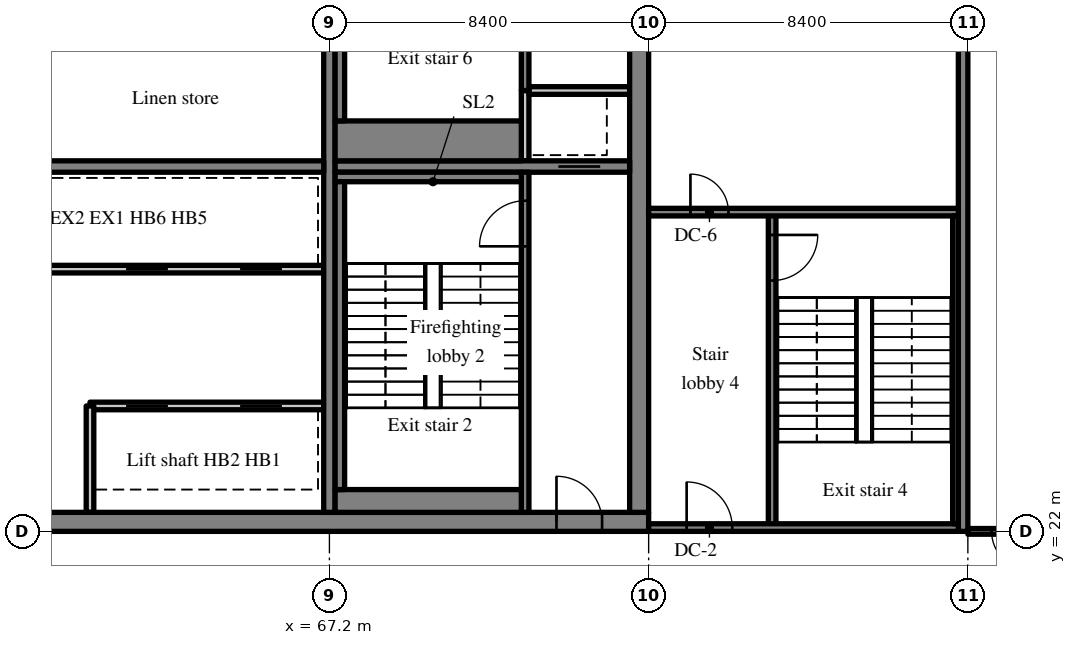
"""IFC4 building model, lengths in metres.
Left out: names, types, materials, properties, quantities, classifications, styles, units other than length and angle.
Written with IfcOpenShell. Run it as: python <this file> out.ifc"""

import sys

from ifc_helpers import new_model, si_unit, direction, frame, frame_2d, origin, place, context, subcontext, project, spatial, rectangle, extrude, source, transform, mapped, element, fill, save


model = new_model("IFC4")
c1 = context("Model", 3, precision=1e-05, world=origin(), true_north=direction((0.0, 1.0)))
c2 = subcontext(c1, "Body", "Model", "MODEL_VIEW")
j1 = project(units=[si_unit("LENGTHUNIT", "METRE"), si_unit("PLANEANGLEUNIT", "RADIAN")], contexts=[c1])
p1 = place(None, origin())
s1 = spatial("IfcSite", under=j1, at=p1, CompositionType="ELEMENT")
p2 = place(p1, origin())
s2 = spatial("IfcBuilding", under=s1, at=p2, CompositionType="ELEMENT")
p3 = place(p2, frame((0.0, 0.0, 277.7)))
s3 = spatial("IfcBuildingStorey", under=s2, at=p3, CompositionType="ELEMENT", Elevation=277.7)
m1 = source(origin(), c2, "Body", "SweptSolid", [
    extrude(rectangle(XDim=50.4, YDim=0.5, at=frame_2d((25.2, 0.0))), origin(), (0.0, 0.0, 1.0), 3.72),
])
p4 = place(p3, frame((25.2, 22.25, 0.0), z_axis=(0.0, 0.0, 1.0), x_axis=(1.0, 0.0, 0.0)))
e1 = element("IfcWall", 1, at=p4, inside=s3, PredefinedType="SHEAR", context=c2, shape_type="MappedRepresentation", body=[
    mapped(m1, transform((0.0, 0.0, 0.0), scale=1.0)),
])
m2 = source(origin(), c2, "Body", "SweptSolid", [
    extrude(rectangle(XDim=1.8, YDim=2.1, at=frame_2d((0.9, 1.05))), frame((0.0, 0.26, 0.0), z_axis=(0.0, -1.0, 0.0), x_axis=(1.0, 0.0, 0.0)), (0.0, 0.0, 1.0), 0.52),
])
p5 = place(p4, frame((15.9, 0.0, 0.0)))
e2 = element("IfcOpeningElement", 2, at=p5, cuts=e1, PredefinedType="OPENING", context=c2, shape_type="MappedRepresentation", body=[
    mapped(m2, transform((0.0, 0.0, 0.0), scale=1.0)),
])
m3 = source(origin(), c2, "Body", "SweptSolid", [
    extrude(rectangle(XDim=0.9, YDim=2.1, at=frame_2d((0.45, 1.05))), frame((0.0, 0.26, 0.0), z_axis=(0.0, -1.0, 0.0), x_axis=(1.0, 0.0, 0.0)), (0.0, 0.0, 1.0), 0.52),
])
p6 = place(p4, frame((21.525, 0.0, 0.0)))
e3 = element("IfcOpeningElement", 3, at=p6, cuts=e1, PredefinedType="OPENING", context=c2, shape_type="MappedRepresentation", body=[
    mapped(m3, transform((0.0, 0.0, 0.0), scale=1.0)),
])
p7 = place(p4, frame((32.7, 0.0, 0.0)))
e4 = element("IfcOpeningElement", 4, at=p7, cuts=e1, PredefinedType="OPENING", context=c2, shape_type="MappedRepresentation", body=[
    mapped(m2, transform((0.0, 0.0, 0.0), scale=1.0)),
])
m4 = source(origin(), c2, "Body", "SweptSolid", [
    extrude(rectangle(XDim=1.2, YDim=2.1, at=frame_2d((0.6, 1.05))), frame((0.0, 0.26, 0.0), z_axis=(0.0, -1.0, 0.0), x_axis=(1.0, 0.0, 0.0)), (0.0, 0.0, 1.0), 0.52),
])
p8 = place(p4, frame((6.5, 0.0, 0.0)))
e5 = element("IfcOpeningElement", 5, at=p8, cuts=e1, PredefinedType="OPENING", context=c2, shape_type="MappedRepresentation", body=[
    mapped(m4, transform((0.0, 0.0, 0.0), scale=1.0)),
])
p9 = place(p4, frame((47.975, 0.0, 0.0)))
e6 = element("IfcOpeningElement", 6, at=p9, cuts=e1, PredefinedType="OPENING", context=c2, shape_type="MappedRepresentation", body=[
    mapped(m4, transform((0.0, 0.0, 0.0), scale=1.0)),
])
m5 = source(origin(), c2, "Body", "SweptSolid", [
    extrude(rectangle(XDim=19.0, YDim=0.5, at=frame_2d((9.5, 0.0))), origin(), (0.0, 0.0, 1.0), 3.72),
])
p10 = place(p3, frame((75.35, 22.5, 0.0), z_axis=(0.0, 0.0, 1.0), x_axis=(0.0, 1.0, 0.0)))
e7 = element("IfcWall", 7, at=p10, inside=s3, PredefinedType="SHEAR", context=c2, shape_type="MappedRepresentation", body=[
    mapped(m5, transform((0.0, 0.0, 0.0), scale=1.0)),
])
p11 = place(p10, frame((12.9, 0.0, 0.0)))
e8 = element("IfcOpeningElement", 8, at=p11, cuts=e7, PredefinedType="OPENING", context=c2, shape_type="MappedRepresentation", body=[
    mapped(m4, transform((0.0, 0.0, 0.0), scale=1.0)),
])
m6 = source(origin(), c2, "Body", "SweptSolid", [
    extrude(rectangle(XDim=19.0, YDim=0.3, at=frame_2d((9.5, 0.0))), origin(), (0.0, 0.0, 1.0), 3.72),
])
p12 = place(p3, frame((67.2, 22.5, 0.0), z_axis=(0.0, 0.0, 1.0), x_axis=(0.0, 1.0, 0.0)))
e9 = element("IfcWall", 9, at=p12, inside=s3, PredefinedType="SHEAR", context=c2, shape_type="MappedRepresentation", body=[
    mapped(m6, transform((0.0, 0.0, 0.0), scale=1.0)),
])
m7 = source(origin(), c2, "Body", "SweptSolid", [
    extrude(rectangle(XDim=16.5, YDim=0.3, at=frame_2d((8.25, 0.0))), origin(), (0.0, 0.0, 1.0), 3.72),
])
p13 = place(p3, frame((50.55, 31.6, 0.0), z_axis=(0.0, 0.0, 1.0), x_axis=(1.0, 0.0, 0.0)))
e10 = element("IfcWall", 10, at=p13, inside=s3, PredefinedType="SHEAR", context=c2, shape_type="MappedRepresentation", body=[
    mapped(m7, transform((0.0, 0.0, 0.0), scale=1.0)),
])
m8 = source(origin(), c2, "Body", "SweptSolid", [
    extrude(rectangle(XDim=1.0, YDim=2.1, at=frame_2d((0.5, 1.05))), frame((0.0, 0.16, 0.0), z_axis=(0.0, -1.0, 0.0), x_axis=(1.0, 0.0, 0.0)), (0.0, 0.0, 1.0), 0.32),
])
p14 = place(p13, frame((0.625, 0.0, 0.0)))
e11 = element("IfcOpeningElement", 11, at=p14, cuts=e10, PredefinedType="OPENING", context=c2, shape_type="MappedRepresentation", body=[
    mapped(m8, transform((0.0, 0.0, 0.0), scale=1.0)),
])
m9 = source(origin(), c2, "Body", "SweptSolid", [
    extrude(rectangle(XDim=7.75, YDim=0.3, at=frame_2d((3.875, 0.0))), origin(), (0.0, 0.0, 1.0), 3.72),
])
p15 = place(p3, frame((67.35, 31.6, 0.0), z_axis=(0.0, 0.0, 1.0), x_axis=(1.0, 0.0, 0.0)))
e12 = element("IfcWall", 12, at=p15, inside=s3, PredefinedType="SHEAR", context=c2, shape_type="MappedRepresentation", body=[
    mapped(m9, transform((0.0, 0.0, 0.0), scale=1.0)),
])
m10 = source(origin(), c2, "Body", "SweptSolid", [
    extrude(rectangle(XDim=1.1, YDim=2.1, at=frame_2d((0.55, 1.05))), frame((0.0, 0.16, 0.0), z_axis=(0.0, -1.0, 0.0), x_axis=(1.0, 0.0, 0.0)), (0.0, 0.0, 1.0), 0.32),
])
p16 = place(p15, frame((5.875, 0.0, 0.0)))
e13 = element("IfcOpeningElement", 13, at=p16, cuts=e12, PredefinedType="OPENING", context=c2, shape_type="MappedRepresentation", body=[
    mapped(m10, transform((0.0, 0.0, 0.0), scale=1.0)),
])
m11 = source(origin(), c2, "Body", "SweptSolid", [
    extrude(rectangle(XDim=18.4, YDim=0.25, at=frame_2d((9.2, 0.0))), origin(), (0.0, 0.0, 1.0), 3.72),
])
p17 = place(p3, frame((83.875, 22.0, 0.0), z_axis=(0.0, 0.0, 1.0), x_axis=(0.0, 1.0, 0.0)))
e14 = element("IfcWall", 14, at=p17, inside=s3, PredefinedType="SHEAR", context=c2, shape_type="MappedRepresentation", body=[
    mapped(m11, transform((0.0, 0.0, 0.0), scale=1.0)),
])
m12 = source(origin(), c2, "Body", "SweptSolid", [
    extrude(rectangle(XDim=6.15, YDim=0.2, at=frame_2d((3.075, 0.0))), origin(), (0.0, 0.0, 1.0), 3.72),
])
p18 = place(p3, frame((67.05, 25.3, 0.0), z_axis=(0.0, 0.0, 1.0), x_axis=(-1.0, 0.0, 0.0)))
e15 = element("IfcWall", 15, at=p18, inside=s3, PredefinedType="SOLIDWALL", context=c2, shape_type="MappedRepresentation", body=[
    mapped(m12, transform((0.0, 0.0, 0.0), scale=1.0)),
])
m13 = source(origin(), c2, "Body", "SweptSolid", [
    extrude(rectangle(XDim=1.1, YDim=2.1, at=frame_2d((0.55, 1.05))), frame((0.0, 0.11, 0.0), z_axis=(0.0, -1.0, 0.0), x_axis=(1.0, 0.0, 0.0)), (0.0, 0.0, 1.0), 0.22),
])
p19 = place(p18, frame((1.1, 0.0, 0.0)))
e16 = element("IfcOpeningElement", 16, at=p19, cuts=e15, PredefinedType="OPENING", context=c2, shape_type="MappedRepresentation", body=[
    mapped(m13, transform((0.0, 0.0, 0.0), scale=1.0)),
])
p20 = place(p18, frame((4.1, 0.0, 0.0)))
e17 = element("IfcOpeningElement", 17, at=p20, cuts=e15, PredefinedType="OPENING", context=c2, shape_type="MappedRepresentation", body=[
    mapped(m13, transform((0.0, 0.0, 0.0), scale=1.0)),
])
m14 = source(origin(), c2, "Body", "SweptSolid", [
    extrude(rectangle(XDim=12.15, YDim=0.2, at=frame_2d((6.075, 0.0))), origin(), (0.0, 0.0, 1.0), 3.72),
])
p21 = place(p3, frame((67.05, 28.9, 0.0), z_axis=(0.0, 0.0, 1.0), x_axis=(-1.0, 0.0, 0.0)))
e18 = element("IfcWall", 18, at=p21, inside=s3, PredefinedType="SOLIDWALL", context=c2, shape_type="MappedRepresentation", body=[
    mapped(m14, transform((0.0, 0.0, 0.0), scale=1.0)),
])
p22 = place(p21, frame((1.1, 0.0, 0.0)))
e19 = element("IfcOpeningElement", 19, at=p22, cuts=e18, PredefinedType="OPENING", context=c2, shape_type="MappedRepresentation", body=[
    mapped(m13, transform((0.0, 0.0, 0.0), scale=1.0)),
])
p23 = place(p21, frame((4.1, 0.0, 0.0)))
e20 = element("IfcOpeningElement", 20, at=p23, cuts=e18, PredefinedType="OPENING", context=c2, shape_type="MappedRepresentation", body=[
    mapped(m13, transform((0.0, 0.0, 0.0), scale=1.0)),
])
m15 = source(origin(), c2, "Body", "SweptSolid", [
    extrude(rectangle(XDim=2.8, YDim=0.2, at=frame_2d((1.4, 0.0))), origin(), (0.0, 0.0, 1.0), 3.72),
])
p24 = place(p3, frame((60.9, 22.5, 0.0), z_axis=(0.0, 0.0, 1.0), x_axis=(0.0, 1.0, 0.0)))
e21 = element("IfcWall", 21, at=p24, inside=s3, PredefinedType="SOLIDWALL", context=c2, shape_type="MappedRepresentation", body=[
    mapped(m15, transform((0.0, 0.0, 0.0), scale=1.0)),
])
m16 = source(origin(), c2, "Body", "SweptSolid", [
    extrude(rectangle(XDim=8.95, YDim=0.2, at=frame_2d((4.475, 0.0))), origin(), (0.0, 0.0, 1.0), 3.72),
])
p25 = place(p3, frame((72.35, 22.5, 0.0), z_axis=(0.0, 0.0, 1.0), x_axis=(0.0, 1.0, 0.0)))
e22 = element("IfcWall", 22, at=p25, inside=s3, PredefinedType="SOLIDWALL", context=c2, shape_type="MappedRepresentation", body=[
    mapped(m16, transform((0.0, 0.0, 0.0), scale=1.0)),
])
m17 = source(origin(), c2, "Body", "SweptSolid", [
    extrude(rectangle(XDim=1.2, YDim=2.1, at=frame_2d((0.6, 1.05))), frame((0.0, 0.11, 0.0), z_axis=(0.0, -1.0, 0.0), x_axis=(1.0, 0.0, 0.0)), (0.0, 0.0, 1.0), 0.22),
])
p26 = place(p25, frame((7.0, 0.0, 0.0)))
e23 = element("IfcOpeningElement", 23, at=p26, cuts=e22, PredefinedType="OPENING", context=c2, shape_type="MappedRepresentation", body=[
    mapped(m17, transform((0.0, 0.0, 0.0), scale=1.0)),
])
m18 = source(origin(), c2, "Body", "SweptSolid", [
    extrude(rectangle(XDim=1.85, YDim=0.2, at=frame_2d((0.925, 0.0))), origin(), (0.0, 0.0, 1.0), 3.72),
])
p27 = place(p3, frame((72.35, 31.75, 0.0), z_axis=(0.0, 0.0, 1.0), x_axis=(0.0, 1.0, 0.0)))
e24 = element("IfcWall", 24, at=p27, inside=s3, PredefinedType="SOLIDWALL", context=c2, shape_type="MappedRepresentation", body=[
    mapped(m18, transform((0.0, 0.0, 0.0), scale=1.0)),
])
m19 = source(origin(), c2, "Body", "SweptSolid", [
    extrude(rectangle(XDim=2.65, YDim=0.2, at=frame_2d((1.325, 0.0))), origin(), (0.0, 0.0, 1.0), 3.72),
])
p28 = place(p3, frame((72.45, 33.6, 0.0), z_axis=(0.0, 0.0, 1.0), x_axis=(1.0, 0.0, 0.0)))
e25 = element("IfcWall", 25, at=p28, inside=s3, PredefinedType="SOLIDWALL", context=c2, shape_type="MappedRepresentation", body=[
    mapped(m19, transform((0.0, 0.0, 0.0), scale=1.0)),
])
m20 = source(origin(), c2, "Body", "SweptSolid", [
    extrude(rectangle(XDim=7.9, YDim=0.2, at=frame_2d((3.95, 0.0))), origin(), (0.0, 0.0, 1.0), 3.72),
])
p29 = place(p3, frame((72.35, 33.6, 0.0), z_axis=(0.0, 0.0, 1.0), x_axis=(0.0, 1.0, 0.0)))
e26 = element("IfcWall", 26, at=p29, inside=s3, PredefinedType="SOLIDWALL", context=c2, shape_type="MappedRepresentation", body=[
    mapped(m20, transform((0.0, 0.0, 0.0), scale=1.0)),
])
m21 = source(origin(), c2, "Body", "SweptSolid", [
    extrude(rectangle(XDim=1.8, YDim=2.1, at=frame_2d((0.9, 1.05))), frame((0.0, 0.11, 0.0), z_axis=(0.0, -1.0, 0.0), x_axis=(1.0, 0.0, 0.0)), (0.0, 0.0, 1.0), 0.22),
])
p30 = place(p29, frame((5.3, 0.0, 0.0)))
e27 = element("IfcOpeningElement", 27, at=p30, cuts=e26, PredefinedType="OPENING", context=c2, shape_type="MappedRepresentation", body=[
    mapped(m21, transform((0.0, 0.0, 0.0), scale=1.0)),
])
m22 = source(origin(), c2, "Body", "SweptSolid", [
    extrude(rectangle(XDim=8.3, YDim=0.2, at=frame_2d((4.15, 0.0))), origin(), (0.0, 0.0, 1.0), 3.72),
])
p31 = place(p3, frame((78.85, 22.1, 0.0), z_axis=(0.0, 0.0, 1.0), x_axis=(0.0, 1.0, 0.0)))
e28 = element("IfcWall", 28, at=p31, inside=s3, PredefinedType="SOLIDWALL", context=c2, shape_type="MappedRepresentation", body=[
    mapped(m22, transform((0.0, 0.0, 0.0), scale=1.0)),
])
p32 = place(p31, frame((6.5, 0.0, 0.0)))
e29 = element("IfcOpeningElement", 29, at=p32, cuts=e28, PredefinedType="OPENING", context=c2, shape_type="MappedRepresentation", body=[
    mapped(m17, transform((0.0, 0.0, 0.0), scale=1.0)),
])
m23 = source(origin(), c2, "Body", "SweptSolid", [
    extrude(rectangle(XDim=8.15, YDim=0.2, at=frame_2d((4.075, 0.0))), origin(), (0.0, 0.0, 1.0), 3.72),
])
p33 = place(p3, frame((83.75, 22.1, 0.0), z_axis=(0.0, 0.0, 1.0), x_axis=(-1.0, 0.0, 0.0)))
e30 = element("IfcWall", 30, at=p33, inside=s3, PredefinedType="SOLIDWALL", context=c2, shape_type="MappedRepresentation", body=[
    mapped(m23, transform((0.0, 0.0, 0.0), scale=1.0)),
])
p34 = place(p33, frame((5.95, 0.0, 0.0)))
e31 = element("IfcOpeningElement", 31, at=p34, cuts=e30, PredefinedType="OPENING", context=c2, shape_type="MappedRepresentation", body=[
    mapped(m17, transform((0.0, 0.0, 0.0), scale=1.0)),
])
p35 = place(p3, frame((83.75, 30.4, 0.0), z_axis=(0.0, 0.0, 1.0), x_axis=(-1.0, 0.0, 0.0)))
e32 = element("IfcWall", 32, at=p35, inside=s3, PredefinedType="SOLIDWALL", context=c2, shape_type="MappedRepresentation", body=[
    mapped(m23, transform((0.0, 0.0, 0.0), scale=1.0)),
])
m24 = source(origin(), c2, "Body", "SweptSolid", [
    extrude(rectangle(XDim=1.0, YDim=2.1, at=frame_2d((0.5, 1.05))), frame((0.0, 0.11, 0.0), z_axis=(0.0, -1.0, 0.0), x_axis=(1.0, 0.0, 0.0)), (0.0, 0.0, 1.0), 0.22),
])
p36 = place(p35, frame((6.05, 0.0, 0.0)))
e33 = element("IfcOpeningElement", 33, at=p36, cuts=e32, PredefinedType="OPENING", context=c2, shape_type="MappedRepresentation", body=[
    mapped(m24, transform((0.0, 0.0, 0.0), scale=1.0)),
])
m25 = source(origin(), c2, "Body", "SweptSolid", [
    extrude(rectangle(XDim=4.9, YDim=0.6, at=frame_2d((2.45, 0.0))), origin(), (0.0, 0.0, 1.0), 3.72),
])
p37 = place(p3, frame((67.35, 22.8, 0.0), z_axis=(0.0, 0.0, 1.0), x_axis=(1.0, 0.0, 0.0)))
e34 = element("IfcWall", 34, at=p37, inside=s3, PredefinedType="SOLIDWALL", context=c2, shape_type="MappedRepresentation", body=[
    mapped(m25, transform((0.0, 0.0, 0.0), scale=1.0)),
])
m26 = source(origin(), c2, "Body", "SweptSolid", [
    extrude(rectangle(XDim=4.9, YDim=0.25, at=frame_2d((2.45, 0.0))), origin(), (0.0, 0.0, 1.0), 3.72),
])
p38 = place(p3, frame((67.35, 31.325, 0.0), z_axis=(0.0, 0.0, 1.0), x_axis=(1.0, 0.0, 0.0)))
e35 = element("IfcWall", 35, at=p38, inside=s3, PredefinedType="SOLIDWALL", context=c2, shape_type="MappedRepresentation", body=[
    mapped(m26, transform((0.0, 0.0, 0.0), scale=1.0)),
])
m27 = source(origin(), c2, "Body", "SweptSolid", [
    extrude(rectangle(XDim=8.1, YDim=0.25, at=frame_2d((4.05, 0.0))), origin(), (0.0, 0.0, 1.0), 3.72),
])
p39 = place(p3, frame((67.475, 23.1, 0.0), z_axis=(0.0, 0.0, 1.0), x_axis=(0.0, 1.0, 0.0)))
e36 = element("IfcWall", 36, at=p39, inside=s3, PredefinedType="SOLIDWALL", context=c2, shape_type="MappedRepresentation", body=[
    mapped(m27, transform((0.0, 0.0, 0.0), scale=1.0)),
])
m28 = source(origin(), c2, "Body", "SweptSolid", [
    extrude(rectangle(XDim=4.9, YDim=1.05, at=frame_2d((2.45, 0.0))), origin(), (0.0, 0.0, 1.0), 3.72),
])
p40 = place(p3, frame((67.35, 32.275, 0.0), z_axis=(0.0, 0.0, 1.0), x_axis=(1.0, 0.0, 0.0)))
e37 = element("IfcWall", 37, at=p40, inside=s3, PredefinedType="SOLIDWALL", context=c2, shape_type="MappedRepresentation", body=[
    mapped(m28, transform((0.0, 0.0, 0.0), scale=1.0)),
])
p41 = place(p3, frame((67.475, 32.8, 0.0), z_axis=(0.0, 0.0, 1.0), x_axis=(0.0, 1.0, 0.0)))
e38 = element("IfcWall", 38, at=p41, inside=s3, PredefinedType="SOLIDWALL", context=c2, shape_type="MappedRepresentation", body=[
    mapped(m27, transform((0.0, 0.0, 0.0), scale=1.0)),
])
m29 = source(origin(), c2, "Body", "SweptSolid", [
    extrude(rectangle(XDim=8.1, YDim=0.15, at=frame_2d((4.05, 0.0))), origin(), (0.0, 0.0, 1.0), 3.72),
])
p42 = place(p3, frame((83.675, 22.2, 0.0), z_axis=(0.0, 0.0, 1.0), x_axis=(0.0, 1.0, 0.0)))
e39 = element("IfcWall", 39, at=p42, inside=s3, PredefinedType="SOLIDWALL", context=c2, shape_type="MappedRepresentation", body=[
    mapped(m29, transform((0.0, 0.0, 0.0), scale=1.0)),
])
m30 = source(origin(), c2, "Body", "SweptSolid", [
    extrude(rectangle(XDim=1.9, YDim=0.15, at=frame_2d((0.95, 0.0))), origin(), (0.0, 0.0, 1.0), 3.02),
])
p43 = place(p3, frame((84.0, 22.0, 0.0), z_axis=(0.0, 0.0, 1.0), x_axis=(1.0, 0.0, 0.0)))
e40 = element("IfcWall", 40, at=p43, inside=s3, PredefinedType="PARTITIONING", context=c2, shape_type="MappedRepresentation", body=[
    mapped(m30, transform((0.0, 0.0, 0.0), scale=1.0)),
])
m31 = source(origin(), c2, "Body", "SweptSolid", [
    extrude(rectangle(XDim=1.0, YDim=2.1, at=frame_2d((0.5, 1.05))), frame((0.0, 0.085, 0.0), z_axis=(0.0, -1.0, 0.0), x_axis=(1.0, 0.0, 0.0)), (0.0, 0.0, 1.0), 0.17),
])
p44 = place(p43, frame((0.625, 0.0, 0.0)))
e41 = element("IfcOpeningElement", 41, at=p44, cuts=e40, PredefinedType="OPENING", context=c2, shape_type="MappedRepresentation", body=[
    mapped(m31, transform((0.0, 0.0, 0.0), scale=1.0)),
])
m32 = source(origin(), c2, "Body", "SweptSolid", [
    extrude(rectangle(XDim=1.1, YDim=2.1, at=frame_2d((0.55, 1.05))), frame((0.0, 0.025, 0.0), z_axis=(0.0, -1.0, 0.0), x_axis=(1.0, 0.0, 0.0)), (0.0, 0.0, 1.0), 0.05),
])
p45 = place(p19, origin())
e42 = element("IfcDoor", 42, at=p45, inside=s3, OperationType="SLIDING_TO_RIGHT", PredefinedType="DOOR", context=c2, shape_type="MappedRepresentation", body=[
    mapped(m32, transform((0.0, 0.0, 0.0), scale=1.0)),
])
fill(e16, e42)
p46 = place(p20, origin())
e43 = element("IfcDoor", 43, at=p46, inside=s3, OperationType="SLIDING_TO_LEFT", PredefinedType="DOOR", context=c2, shape_type="MappedRepresentation", body=[
    mapped(m32, transform((0.0, 0.0, 0.0), scale=1.0)),
])
fill(e17, e43)
p47 = place(p22, origin())
e44 = element("IfcDoor", 44, at=p47, inside=s3, OperationType="SLIDING_TO_RIGHT", PredefinedType="DOOR", context=c2, shape_type="MappedRepresentation", body=[
    mapped(m32, transform((0.0, 0.0, 0.0), scale=1.0)),
])
fill(e19, e44)
p48 = place(p23, origin())
e45 = element("IfcDoor", 45, at=p48, inside=s3, OperationType="SLIDING_TO_LEFT", PredefinedType="DOOR", context=c2, shape_type="MappedRepresentation", body=[
    mapped(m32, transform((0.0, 0.0, 0.0), scale=1.0)),
])
fill(e20, e45)
m33 = source(origin(), c2, "Body", "SweptSolid", [
    extrude(rectangle(XDim=1.2, YDim=2.1, at=frame_2d((0.6, 1.05))), frame((0.0, 0.025, 0.0), z_axis=(0.0, -1.0, 0.0), x_axis=(1.0, 0.0, 0.0)), (0.0, 0.0, 1.0), 0.05),
])
p49 = place(p26, origin())
e46 = element("IfcDoor", 46, at=p49, inside=s3, OperationType="SINGLE_SWING_LEFT", PredefinedType="DOOR", context=c2, shape_type="MappedRepresentation", body=[
    mapped(m33, transform((0.0, 0.0, 0.0), scale=1.0)),
])
fill(e23, e46)
m34 = source(origin(), c2, "Body", "SweptSolid", [
    extrude(rectangle(XDim=1.2, YDim=2.1, at=frame_2d((0.6, 1.05))), frame((0.0, 0.175, 0.0), z_axis=(0.0, -1.0, 0.0), x_axis=(1.0, 0.0, 0.0)), (0.0, 0.0, 1.0), 0.05),
])
p50 = place(p9, origin())
e47 = element("IfcDoor", 47, at=p50, inside=s3, OperationType="SINGLE_SWING_LEFT", PredefinedType="DOOR", context=c2, shape_type="MappedRepresentation", body=[
    mapped(m34, transform((0.0, 0.0, 0.0), scale=1.0)),
])
fill(e6, e47)
p51 = place(p16, origin())
e48 = element("IfcDoor", 48, at=p51, inside=s3, OperationType="SLIDING_TO_RIGHT", PredefinedType="DOOR", context=c2, shape_type="MappedRepresentation", body=[
    mapped(m32, transform((0.0, 0.0, 0.0), scale=1.0)),
])
fill(e13, e48)
p52 = place(p32, origin())
e49 = element("IfcDoor", 49, at=p52, inside=s3, OperationType="SINGLE_SWING_RIGHT", PredefinedType="DOOR", context=c2, shape_type="MappedRepresentation", body=[
    mapped(m33, transform((0.0, 0.0, 0.0), scale=1.0)),
])
fill(e29, e49)
p53 = place(p34, origin())
e50 = element("IfcDoor", 50, at=p53, inside=s3, OperationType="SINGLE_SWING_RIGHT", PredefinedType="DOOR", context=c2, shape_type="MappedRepresentation", body=[
    mapped(m33, transform((0.0, 0.0, 0.0), scale=1.0)),
])
fill(e31, e50)
m35 = source(origin(), c2, "Body", "SweptSolid", [
    extrude(rectangle(XDim=1.0, YDim=2.1, at=frame_2d((0.5, 1.05))), frame((0.0, 0.025, 0.0), z_axis=(0.0, -1.0, 0.0), x_axis=(1.0, 0.0, 0.0)), (0.0, 0.0, 1.0), 0.05),
])
p54 = place(p36, origin())
e51 = element("IfcDoor", 51, at=p54, inside=s3, OperationType="SINGLE_SWING_RIGHT", PredefinedType="DOOR", context=c2, shape_type="MappedRepresentation", body=[
    mapped(m35, transform((0.0, 0.0, 0.0), scale=1.0)),
])
fill(e33, e51)
p55 = place(p44, origin())
e52 = element("IfcDoor", 52, at=p55, inside=s3, OperationType="SINGLE_SWING_RIGHT", PredefinedType="DOOR", context=c2, shape_type="MappedRepresentation", body=[
    mapped(m35, transform((0.0, 0.0, 0.0), scale=1.0)),
])
fill(e41, e52)
save(model, sys.argv[1])
